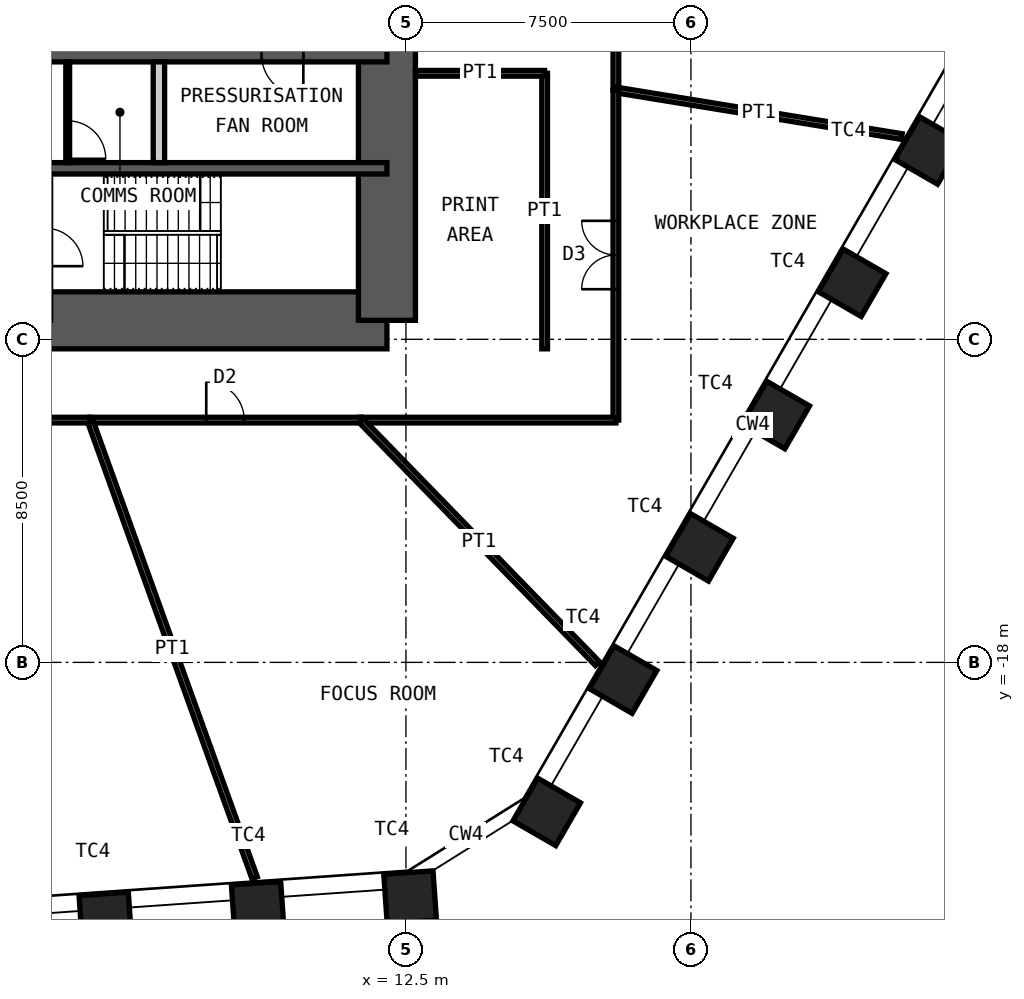
"""IFC4 building model, lengths in metres.
Left out: names, types, materials, properties, quantities, classifications, styles, units other than length and angle.
Written with IfcOpenShell. Run it as: python <this file> out.ifc"""

import sys

from ifc_helpers import new_model, si_unit, direction, frame, frame_2d, origin, origin_2d, place, context, subcontext, project, spatial, rectangle, hollow_rectangle, extrude, element, fill, save


model = new_model("IFC4")
c1 = context("Model", 3, precision=1e-05, world=origin(), true_north=direction((0.0, 1.0)))
c2 = subcontext(c1, "Body", "Model", "MODEL_VIEW")
j1 = project(units=[si_unit("LENGTHUNIT", "METRE"), si_unit("PLANEANGLEUNIT", "RADIAN")], contexts=[c1])
p1 = place(None, origin())
s1 = spatial("IfcSite", under=j1, at=p1, CompositionType="ELEMENT")
p2 = place(p1, origin())
s2 = spatial("IfcBuilding", under=s1, at=p2, CompositionType="ELEMENT")
p3 = place(p2, frame((0.0, 0.0, 157.6)))
s3 = spatial("IfcBuildingStorey", under=s2, at=p3, CompositionType="ELEMENT", Elevation=157.6)
for number, where, z_axis, x_axis in (
    (1, (26.252, -4.53, 0.0), (0.0, 0.0, 1.0), (0.5, 0.866, 0.0)),
    (2, (24.242, -8.011, 0.0), (0.0, 0.0, 1.0), (0.5, 0.866, 0.0)),
    (3, (22.233, -11.491, 0.0), (0.0, 0.0, 1.0), (0.5, 0.866, 0.0)),
    (4, (20.223, -14.972, 0.0), (0.0, 0.0, 1.0), (0.5, 0.866, 0.0)),
    (5, (18.214, -18.453, 0.0), (0.0, 0.0, 1.0), (0.5, 0.866, 0.0)),
    (6, (16.204, -21.933, 0.0), (0.0, 0.0, 1.0), (0.5, 0.866, 0.0)),
    (7, (12.61, -24.179, 0.0), (0.0, 0.0, 1.0), (0.998, 0.07, 0.0)),
    (8, (8.601, -24.46, 0.0), (0.0, 0.0, 1.0), (0.998, 0.07, 0.0)),
    (9, (4.592, -24.74, 0.0), (0.0, 0.0, 1.0), (0.998, 0.07, 0.0)),
):
    element("IfcColumn", number, at=place(p3, frame(where, z_axis=z_axis, x_axis=x_axis)), inside=s3, PredefinedType="COLUMN", context=c2, shape_type="SweptSolid", body=[
        extrude(hollow_rectangle(XDim=1.3, YDim=1.3, WallThickness=0.1, at=origin_2d()), origin(), (0.0, 0.0, 1.0), 4.2),
    ])
p4 = place(p3, frame((-12.0, -9.0, 0.0), z_axis=(0.0, 0.0, 1.0), x_axis=(1.0, 0.0, 0.0)))
e10 = element("IfcWall", 10, at=p4, inside=s3, PredefinedType="SHEAR", context=c2, shape_type="SweptSolid", body=[
    extrude(rectangle(XDim=24.0, YDim=1.5, at=frame_2d((12.0, 0.0))), origin(), (0.0, 0.0, 1.0), 4.2),
])
p5 = place(p4, frame((1.35, 0.0, 0.0)))
e11 = element("IfcOpeningElement", 11, at=p5, cuts=e10, PredefinedType="OPENING", context=c2, shape_type="SweptSolid", body=[
    extrude(rectangle(XDim=1.0, YDim=2.1, at=frame_2d((0.5, 1.05))), frame((0.0, 0.76, 0.0), z_axis=(0.0, -1.0, 0.0), x_axis=(1.0, 0.0, 0.0)), (0.0, 0.0, 1.0), 1.52),
])
p6 = place(p4, frame((5.325, 0.0, 0.0)))
e12 = element("IfcOpeningElement", 12, at=p6, cuts=e10, PredefinedType="OPENING", context=c2, shape_type="SweptSolid", body=[
    extrude(rectangle(XDim=1.15, YDim=2.1, at=frame_2d((0.575, 1.05))), frame((0.0, 0.76, 0.0), z_axis=(0.0, -1.0, 0.0), x_axis=(1.0, 0.0, 0.0)), (0.0, 0.0, 1.0), 1.52),
])
p7 = place(p4, frame((12.6, 0.0, 0.0)))
e13 = element("IfcOpeningElement", 13, at=p7, cuts=e10, PredefinedType="OPENING", context=c2, shape_type="SweptSolid", body=[
    extrude(rectangle(XDim=1.0, YDim=2.1, at=frame_2d((0.5, 1.05))), frame((0.0, 0.76, 0.0), z_axis=(0.0, -1.0, 0.0), x_axis=(1.0, 0.0, 0.0)), (0.0, 0.0, 1.0), 1.52),
])
p8 = place(p3, frame((12.0, -9.0, 0.0), z_axis=(0.0, 0.0, 1.0), x_axis=(0.0, 1.0, 0.0)))
e14 = element("IfcWall", 14, at=p8, inside=s3, PredefinedType="SHEAR", context=c2, shape_type="SweptSolid", body=[
    extrude(rectangle(XDim=18.0, YDim=1.5, at=frame_2d((9.0, 0.0))), origin(), (0.0, 0.0, 1.0), 4.2),
])
p9 = place(p8, frame((8.1, 0.0, 0.0)))
e15 = element("IfcOpeningElement", 15, at=p9, cuts=e14, PredefinedType="OPENING", context=c2, shape_type="SweptSolid", body=[
    extrude(rectangle(XDim=1.8, YDim=2.1, at=frame_2d((0.9, 1.05))), frame((0.0, 0.76, 0.0), z_axis=(0.0, -1.0, 0.0), x_axis=(1.0, 0.0, 0.0)), (0.0, 0.0, 1.0), 1.52),
])
p10 = place(p3, frame((-12.0, -2.0, 0.0), z_axis=(0.0, 0.0, 1.0), x_axis=(1.0, 0.0, 0.0)))
e16 = element("IfcWall", 16, at=p10, inside=s3, PredefinedType="SHEAR", context=c2, shape_type="SweptSolid", body=[
    extrude(rectangle(XDim=24.0, YDim=0.4, at=frame_2d((12.0, 0.0))), origin(), (0.0, 0.0, 1.0), 4.2),
])
p11 = place(p10, frame((1.1, 0.0, 0.0)))
e17 = element("IfcOpeningElement", 17, at=p11, cuts=e16, PredefinedType="OPENING", context=c2, shape_type="SweptSolid", body=[
    extrude(rectangle(XDim=1.1, YDim=2.1, at=frame_2d((0.55, 1.05))), frame((0.0, 0.21, 0.0), z_axis=(0.0, -1.0, 0.0), x_axis=(1.0, 0.0, 0.0)), (0.0, 0.0, 1.0), 0.42),
])
p12 = place(p10, frame((13.55, 0.0, 0.0)))
e18 = element("IfcOpeningElement", 18, at=p12, cuts=e16, PredefinedType="OPENING", context=c2, shape_type="SweptSolid", body=[
    extrude(rectangle(XDim=1.1, YDim=2.1, at=frame_2d((0.55, 1.05))), frame((0.0, 0.21, 0.0), z_axis=(0.0, -1.0, 0.0), x_axis=(1.0, 0.0, 0.0)), (0.0, 0.0, 1.0), 0.42),
])
p13 = place(p10, frame((20.7, 0.0, 0.0)))
e19 = element("IfcOpeningElement", 19, at=p13, cuts=e16, PredefinedType="OPENING", context=c2, shape_type="SweptSolid", body=[
    extrude(rectangle(XDim=1.1, YDim=2.1, at=frame_2d((0.55, 1.05))), frame((0.0, 0.21, 0.0), z_axis=(0.0, -1.0, 0.0), x_axis=(1.0, 0.0, 0.0)), (0.0, 0.0, 1.0), 0.42),
])
p14 = place(p10, frame((4.0, 0.0, 0.0)))
e20 = element("IfcOpeningElement", 20, at=p14, cuts=e16, PredefinedType="OPENING", context=c2, shape_type="SweptSolid", body=[
    extrude(rectangle(XDim=1.0, YDim=2.1, at=frame_2d((0.5, 1.05))), frame((0.0, 0.21, 0.0), z_axis=(0.0, -1.0, 0.0), x_axis=(1.0, 0.0, 0.0)), (0.0, 0.0, 1.0), 0.42),
])
p15 = place(p3, frame((-12.0, -5.0, 0.0), z_axis=(0.0, 0.0, 1.0), x_axis=(1.0, 0.0, 0.0)))
e21 = element("IfcWall", 21, at=p15, inside=s3, PredefinedType="SHEAR", context=c2, shape_type="SweptSolid", body=[
    extrude(rectangle(XDim=24.0, YDim=0.3, at=frame_2d((12.0, 0.0))), origin(), (0.0, 0.0, 1.0), 4.2),
])
p16 = place(p3, frame((6.0, -4.85, 0.0), z_axis=(0.0, 0.0, 1.0), x_axis=(0.0, 1.0, 0.0)))
e22 = element("IfcWall", 22, at=p16, inside=s3, PredefinedType="PARTITIONING", context=c2, shape_type="SweptSolid", body=[
    extrude(rectangle(XDim=2.65, YDim=0.3, at=frame_2d((1.325, 0.0))), origin(), (0.0, 0.0, 1.0), 3.98),
])
p17 = place(p3, frame((3.6, -4.85, 0.0), z_axis=(0.0, 0.0, 1.0), x_axis=(0.0, 1.0, 0.0)))
e23 = element("IfcWall", 23, at=p17, inside=s3, PredefinedType="PARTITIONING", context=c2, shape_type="SweptSolid", body=[
    extrude(rectangle(XDim=2.65, YDim=0.1, at=frame_2d((1.325, 0.0))), origin(), (0.0, 0.0, 1.0), 3.98),
])
p18 = place(p17, frame((0.1, 0.0, 0.0)))
e24 = element("IfcOpeningElement", 24, at=p18, cuts=e23, PredefinedType="OPENING", context=c2, shape_type="SweptSolid", body=[
    extrude(rectangle(XDim=1.0, YDim=2.4, at=frame_2d((0.5, 1.2))), frame((0.0, 0.06, 0.0), z_axis=(0.0, -1.0, 0.0), x_axis=(1.0, 0.0, 0.0)), (0.0, 0.0, 1.0), 0.12),
])
p19 = place(p3, frame((18.025, 7.267, 0.0), z_axis=(0.0, 0.0, 1.0), x_axis=(0.0, -1.0, 0.0)))
e25 = element("IfcWall", 25, at=p19, inside=s3, PredefinedType="PARTITIONING", context=c2, shape_type="SweptSolid", body=[
    extrude(rectangle(XDim=10.205, YDim=0.15, at=frame_2d((5.103, 0.0))), origin(), (0.0, 0.0, 1.0), 4.03),
])
p20 = place(p19, frame((4.203, 0.0, 0.0)))
e26 = element("IfcOpeningElement", 26, at=p20, cuts=e25, PredefinedType="OPENING", context=c2, shape_type="SweptSolid", body=[
    extrude(rectangle(XDim=1.8, YDim=2.4, at=frame_2d((0.9, 1.2))), frame((0.0, 0.085, 0.0), z_axis=(0.0, -1.0, 0.0), x_axis=(1.0, 0.0, 0.0)), (0.0, 0.0, 1.0), 0.17),
])
p21 = place(p3, frame((25.547, -4.164, 0.0), z_axis=(0.0, 0.0, 1.0), x_axis=(-0.986975470567, 0.160870819291, 0.0)))
e27 = element("IfcWall", 27, at=p21, inside=s3, PredefinedType="PARTITIONING", context=c2, shape_type="SweptSolid", body=[
    extrude(rectangle(XDim=7.622, YDim=0.15, at=frame_2d((3.811, 0.0))), origin(), (0.0, 0.0, 1.0), 4.03),
])
p22 = place(p3, frame((18.025, -2.938, 0.0), z_axis=(0.0, 0.0, 1.0), x_axis=(0.0, -1.0, 0.0)))
e28 = element("IfcWall", 28, at=p22, inside=s3, PredefinedType="PARTITIONING", context=c2, shape_type="SweptSolid", body=[
    extrude(rectangle(XDim=8.687, YDim=0.15, at=frame_2d((4.344, 0.0))), origin(), (0.0, 0.0, 1.0), 4.03),
])
p23 = place(p22, frame((3.443, 0.0, 0.0)))
e29 = element("IfcOpeningElement", 29, at=p23, cuts=e28, PredefinedType="OPENING", context=c2, shape_type="SweptSolid", body=[
    extrude(rectangle(XDim=1.8, YDim=2.4, at=frame_2d((0.9, 1.2))), frame((0.0, 0.085, 0.0), z_axis=(0.0, -1.0, 0.0), x_axis=(1.0, 0.0, 0.0)), (0.0, 0.0, 1.0), 0.17),
])
p24 = place(p3, frame((18.025, -11.625, 0.0), z_axis=(0.0, 0.0, 1.0), x_axis=(-1.0, 0.0, 0.0)))
e30 = element("IfcWall", 30, at=p24, inside=s3, PredefinedType="PARTITIONING", context=c2, shape_type="SweptSolid", body=[
    extrude(rectangle(XDim=6.718, YDim=0.15, at=frame_2d((3.359, 0.0))), origin(), (0.0, 0.0, 1.0), 4.03),
])
p25 = place(p3, frame((17.538, -18.031, 0.0), z_axis=(0.0, 0.0, 1.0), x_axis=(-0.697230918085, 0.716846599257, 0.0)))
e31 = element("IfcWall", 31, at=p25, inside=s3, PredefinedType="PARTITIONING", context=c2, shape_type="SweptSolid", body=[
    extrude(rectangle(XDim=8.936, YDim=0.15, at=frame_2d((4.468, 0.0))), origin(), (0.0, 0.0, 1.0), 3.33),
])
p26 = place(p3, frame((11.307, -11.625, 0.0), z_axis=(0.0, 0.0, 1.0), x_axis=(-1.0, 0.0, 0.0)))
e32 = element("IfcWall", 32, at=p26, inside=s3, PredefinedType="PARTITIONING", context=c2, shape_type="SweptSolid", body=[
    extrude(rectangle(XDim=7.123, YDim=0.15, at=frame_2d((3.562, 0.0))), origin(), (0.0, 0.0, 1.0), 4.03),
])
p27 = place(p26, frame((3.062, 0.0, 0.0)))
e33 = element("IfcOpeningElement", 33, at=p27, cuts=e32, PredefinedType="OPENING", context=c2, shape_type="SweptSolid", body=[
    extrude(rectangle(XDim=1.0, YDim=2.4, at=frame_2d((0.5, 1.2))), frame((0.0, 0.085, 0.0), z_axis=(0.0, -1.0, 0.0), x_axis=(1.0, 0.0, 0.0)), (0.0, 0.0, 1.0), 0.17),
])
p28 = place(p3, frame((8.518, -23.667, 0.0), z_axis=(0.0, 0.0, 1.0), x_axis=(-0.338635030469, 0.940917805198, 0.0)))
e34 = element("IfcWall", 34, at=p28, inside=s3, PredefinedType="PARTITIONING", context=c2, shape_type="SweptSolid", body=[
    extrude(rectangle(XDim=12.798, YDim=0.15, at=frame_2d((6.399, 0.0))), origin(), (0.0, 0.0, 1.0), 3.33),
])
p29 = place(p3, frame((4.184, -11.625, 0.0), z_axis=(0.0, 0.0, 1.0), x_axis=(-1.0, 0.0, 0.0)))
e35 = element("IfcWall", 35, at=p29, inside=s3, PredefinedType="PARTITIONING", context=c2, shape_type="SweptSolid", body=[
    extrude(rectangle(XDim=9.494, YDim=0.15, at=frame_2d((4.747, 0.0))), origin(), (0.0, 0.0, 1.0), 4.03),
])
p30 = place(p29, frame((3.847, 0.0, 0.0)))
e36 = element("IfcOpeningElement", 36, at=p30, cuts=e35, PredefinedType="OPENING", context=c2, shape_type="SweptSolid", body=[
    extrude(rectangle(XDim=1.8, YDim=2.4, at=frame_2d((0.9, 1.2))), frame((0.0, 0.085, 0.0), z_axis=(0.0, -1.0, 0.0), x_axis=(1.0, 0.0, 0.0)), (0.0, 0.0, 1.0), 0.17),
])
p31 = place(p3, frame((16.15, -9.75, 0.0), z_axis=(0.0, 0.0, 1.0), x_axis=(0.0, 1.0, 0.0)))
e37 = element("IfcWall", 37, at=p31, inside=s3, PredefinedType="PARTITIONING", context=c2, shape_type="SweptSolid", body=[
    extrude(rectangle(XDim=7.25, YDim=0.15, at=frame_2d((3.625, 0.0))), origin(), (0.0, 0.0, 1.0), 4.03),
])
p32 = place(p3, frame((12.75, -2.5, 0.0), z_axis=(0.0, 0.0, 1.0), x_axis=(1.0, 0.0, 0.0)))
e38 = element("IfcWall", 38, at=p32, inside=s3, PredefinedType="PARTITIONING", context=c2, shape_type="SweptSolid", body=[
    extrude(rectangle(XDim=3.4, YDim=0.15, at=frame_2d((1.7, 0.0))), origin(), (0.0, 0.0, 1.0), 3.33),
])
p33 = place(p13, origin())
e39 = element("IfcDoor", 39, at=p33, inside=s3, OperationType="SINGLE_SWING_RIGHT", PredefinedType="DOOR", context=c2, shape_type="SweptSolid", body=[
    extrude(rectangle(XDim=1.1, YDim=2.1, at=frame_2d((0.55, 1.05))), frame((0.0, 0.025, 0.0), z_axis=(0.0, -1.0, 0.0), x_axis=(1.0, 0.0, 0.0)), (0.0, 0.0, 1.0), 0.05),
])
fill(e19, e39)
p34 = place(p18, origin())
e40 = element("IfcDoor", 40, at=p34, inside=s3, OperationType="SINGLE_SWING_LEFT", PredefinedType="DOOR", context=c2, shape_type="SweptSolid", body=[
    extrude(rectangle(XDim=1.0, YDim=2.4, at=frame_2d((0.5, 1.2))), frame((0.0, 0.025, 0.0), z_axis=(0.0, -1.0, 0.0), x_axis=(1.0, 0.0, 0.0)), (0.0, 0.0, 1.0), 0.05),
])
fill(e24, e40)
p35 = place(p23, origin())
e41 = element("IfcDoor", 41, at=p35, inside=s3, OperationType="DOUBLE_DOOR_DOUBLE_SWING", PredefinedType="DOOR", context=c2, shape_type="SweptSolid", body=[
    extrude(rectangle(XDim=1.8, YDim=2.4, at=frame_2d((0.9, 1.2))), frame((0.0, 0.025, 0.0), z_axis=(0.0, -1.0, 0.0), x_axis=(1.0, 0.0, 0.0)), (0.0, 0.0, 1.0), 0.05),
])
fill(e29, e41)
p36 = place(p27, origin())
e42 = element("IfcDoor", 42, at=p36, inside=s3, OperationType="SINGLE_SWING_RIGHT", PredefinedType="DOOR", context=c2, shape_type="SweptSolid", body=[
    extrude(rectangle(XDim=1.0, YDim=2.4, at=frame_2d((0.5, 1.2))), frame((0.0, 0.025, 0.0), z_axis=(0.0, -1.0, 0.0), x_axis=(1.0, 0.0, 0.0)), (0.0, 0.0, 1.0), 0.05),
])
fill(e33, e42)
save(model, sys.argv[1])
